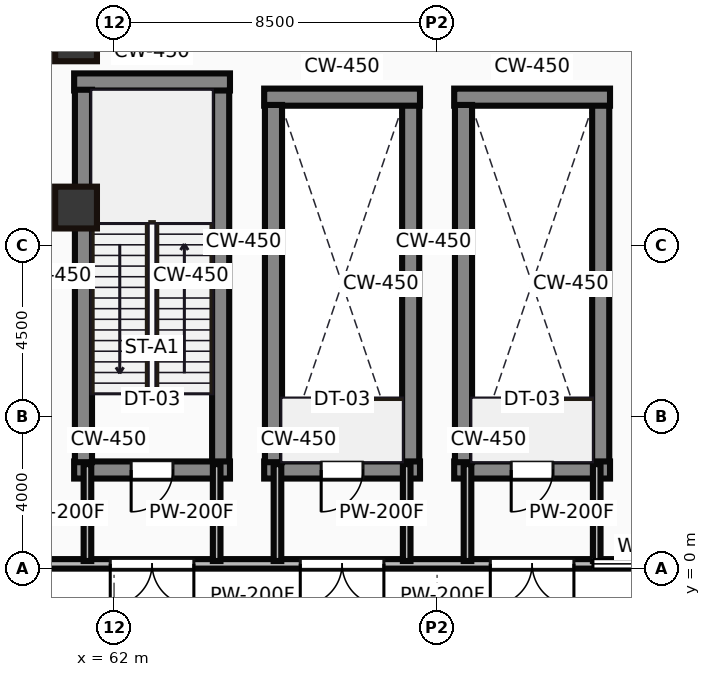
"""IFC4 building model, lengths in metres.
Left out: names, types, materials, properties, quantities, classifications, styles, units other than length and angle.
Written with IfcOpenShell. Run it as: python <this file> out.ifc"""

import sys

from ifc_helpers import new_model, si_unit, direction, frame, frame_2d, origin, origin_2d, place, context, subcontext, project, spatial, rectangle, hollow_rectangle, extrude, source, transform, mapped, element, fill, save


model = new_model("IFC4")
c1 = context("Model", 3, precision=1e-05, world=origin(), true_north=direction((0.0, 1.0)))
c2 = subcontext(c1, "Body", "Model", "MODEL_VIEW")
j1 = project(units=[si_unit("LENGTHUNIT", "METRE"), si_unit("PLANEANGLEUNIT", "RADIAN")], contexts=[c1])
p1 = place(None, origin())
s1 = spatial("IfcSite", under=j1, at=p1, CompositionType="ELEMENT")
p2 = place(p1, origin())
s2 = spatial("IfcBuilding", under=s1, at=p2, CompositionType="ELEMENT")
p3 = place(p2, origin())
s3 = spatial("IfcBuildingStorey", under=s2, at=p3, CompositionType="ELEMENT", Elevation=0.0)
m1 = source(origin(), c2, "Body", "SweptSolid", [
    extrude(hollow_rectangle(XDim=1.1, YDim=1.3, WallThickness=0.055, at=origin_2d()), origin(), (0.0, 0.0, 1.0), 6.0),
])
p4 = place(p3, frame((61.0, 14.0, 0.0), z_axis=(0.0, 0.0, 1.0), x_axis=(1.0, 0.0, 0.0)))
e1 = element("IfcColumn", 1, at=p4, inside=s3, PredefinedType="PILASTER", context=c2, shape_type="MappedRepresentation", body=[
    mapped(m1, transform((0.0, 0.0, 0.0))),
])
m2 = source(origin(), c2, "Body", "SweptSolid", [
    extrude(hollow_rectangle(XDim=1.1, YDim=1.1, WallThickness=0.05, at=origin_2d()), origin(), (0.0, 0.0, 1.0), 6.0),
])
p5 = place(p3, frame((61.0, 9.5, 0.0), z_axis=(0.0, 0.0, 1.0), x_axis=(1.0, 0.0, 0.0)))
e2 = element("IfcColumn", 2, at=p5, inside=s3, PredefinedType="PILASTER", context=c2, shape_type="MappedRepresentation", body=[
    mapped(m2, transform((0.0, 0.0, 0.0))),
])
m3 = source(origin(), c2, "Body", "SweptSolid", [
    extrude(rectangle(XDim=48.0, YDim=0.25, at=frame_2d((24.0, 0.0))), origin(), (0.0, 0.0, 1.0), 5.7),
])
p6 = place(p3, frame((34.0, 0.125, 0.0), z_axis=(0.0, 0.0, 1.0), x_axis=(1.0, 0.0, 0.0)))
e3 = element("IfcWall", 3, at=p6, inside=s3, PredefinedType="STANDARD", context=c2, shape_type="MappedRepresentation", body=[
    mapped(m3, transform((0.0, 0.0, 0.0))),
])
p7 = place(p6, frame((1.2, 0.0, 0.0)))
e4 = element("IfcOpeningElement", 4, at=p7, cuts=e3, PredefinedType="OPENING", context=c2, shape_type="SweptSolid", body=[
    extrude(rectangle(XDim=2.2, YDim=2.4, at=frame_2d((1.1, 1.2))), frame((0.0, 0.135, 0.0), z_axis=(0.0, -1.0, 0.0), x_axis=(1.0, 0.0, 0.0)), (0.0, 0.0, 1.0), 0.27),
])
p8 = place(p6, frame((4.4, 0.0, 0.0)))
e5 = element("IfcOpeningElement", 5, at=p8, cuts=e3, PredefinedType="OPENING", context=c2, shape_type="SweptSolid", body=[
    extrude(rectangle(XDim=2.2, YDim=2.4, at=frame_2d((1.1, 1.2))), frame((0.0, 0.135, 0.0), z_axis=(0.0, -1.0, 0.0), x_axis=(1.0, 0.0, 0.0)), (0.0, 0.0, 1.0), 0.27),
])
p9 = place(p6, frame((10.2, 0.0, 0.0)))
e6 = element("IfcOpeningElement", 6, at=p9, cuts=e3, PredefinedType="OPENING", context=c2, shape_type="SweptSolid", body=[
    extrude(rectangle(XDim=2.2, YDim=2.4, at=frame_2d((1.1, 1.2))), frame((0.0, 0.135, 0.0), z_axis=(0.0, -1.0, 0.0), x_axis=(1.0, 0.0, 0.0)), (0.0, 0.0, 1.0), 0.27),
])
p10 = place(p6, frame((13.4, 0.0, 0.0)))
e7 = element("IfcOpeningElement", 7, at=p10, cuts=e3, PredefinedType="OPENING", context=c2, shape_type="SweptSolid", body=[
    extrude(rectangle(XDim=2.2, YDim=2.4, at=frame_2d((1.1, 1.2))), frame((0.0, 0.135, 0.0), z_axis=(0.0, -1.0, 0.0), x_axis=(1.0, 0.0, 0.0)), (0.0, 0.0, 1.0), 0.27),
])
p11 = place(p6, frame((17.8, 0.0, 0.0)))
e8 = element("IfcOpeningElement", 8, at=p11, cuts=e3, PredefinedType="OPENING", context=c2, shape_type="SweptSolid", body=[
    extrude(rectangle(XDim=2.2, YDim=2.4, at=frame_2d((1.1, 1.2))), frame((0.0, 0.135, 0.0), z_axis=(0.0, -1.0, 0.0), x_axis=(1.0, 0.0, 0.0)), (0.0, 0.0, 1.0), 0.27),
])
p12 = place(p6, frame((21.0, 0.0, 0.0)))
e9 = element("IfcOpeningElement", 9, at=p12, cuts=e3, PredefinedType="OPENING", context=c2, shape_type="SweptSolid", body=[
    extrude(rectangle(XDim=2.2, YDim=2.4, at=frame_2d((1.1, 1.2))), frame((0.0, 0.135, 0.0), z_axis=(0.0, -1.0, 0.0), x_axis=(1.0, 0.0, 0.0)), (0.0, 0.0, 1.0), 0.27),
])
p13 = place(p6, frame((23.6, 0.0, 0.0)))
e10 = element("IfcOpeningElement", 10, at=p13, cuts=e3, PredefinedType="OPENING", context=c2, shape_type="SweptSolid", body=[
    extrude(rectangle(XDim=2.2, YDim=2.4, at=frame_2d((1.1, 1.2))), frame((0.0, 0.135, 0.0), z_axis=(0.0, -1.0, 0.0), x_axis=(1.0, 0.0, 0.0)), (0.0, 0.0, 1.0), 0.27),
])
p14 = place(p6, frame((27.9, 0.0, 0.0)))
e11 = element("IfcOpeningElement", 11, at=p14, cuts=e3, PredefinedType="OPENING", context=c2, shape_type="SweptSolid", body=[
    extrude(rectangle(XDim=2.2, YDim=2.4, at=frame_2d((1.1, 1.2))), frame((0.0, 0.135, 0.0), z_axis=(0.0, -1.0, 0.0), x_axis=(1.0, 0.0, 0.0)), (0.0, 0.0, 1.0), 0.27),
])
p15 = place(p6, frame((32.9, 0.0, 0.0)))
e12 = element("IfcOpeningElement", 12, at=p15, cuts=e3, PredefinedType="OPENING", context=c2, shape_type="SweptSolid", body=[
    extrude(rectangle(XDim=2.2, YDim=2.4, at=frame_2d((1.1, 1.2))), frame((0.0, 0.135, 0.0), z_axis=(0.0, -1.0, 0.0), x_axis=(1.0, 0.0, 0.0)), (0.0, 0.0, 1.0), 0.27),
])
p16 = place(p6, frame((37.9, 0.0, 0.0)))
e13 = element("IfcOpeningElement", 13, at=p16, cuts=e3, PredefinedType="OPENING", context=c2, shape_type="SweptSolid", body=[
    extrude(rectangle(XDim=2.2, YDim=2.4, at=frame_2d((1.1, 1.2))), frame((0.0, 0.135, 0.0), z_axis=(0.0, -1.0, 0.0), x_axis=(1.0, 0.0, 0.0)), (0.0, 0.0, 1.0), 0.27),
])
p17 = place(p6, frame((44.2, 0.0, 0.0)))
e14 = element("IfcOpeningElement", 14, at=p17, cuts=e3, PredefinedType="OPENING", context=c2, shape_type="SweptSolid", body=[
    extrude(rectangle(XDim=2.2, YDim=2.4, at=frame_2d((1.1, 1.2))), frame((0.0, 0.135, 0.0), z_axis=(0.0, -1.0, 0.0), x_axis=(1.0, 0.0, 0.0)), (0.0, 0.0, 1.0), 0.27),
])
p18 = place(p6, frame((40.6, 0.0, 0.9)))
e15 = element("IfcOpeningElement", 15, at=p18, cuts=e3, PredefinedType="OPENING", context=c2, shape_type="SweptSolid", body=[
    extrude(rectangle(XDim=3.0, YDim=2.4, at=frame_2d((1.5, 1.2))), frame((0.0, 0.135, 0.0), z_axis=(0.0, -1.0, 0.0), x_axis=(1.0, 0.0, 0.0)), (0.0, 0.0, 1.0), 0.27),
])
m4 = source(origin(), c2, "Body", "SweptSolid", [
    extrude(rectangle(XDim=4.1, YDim=0.45, at=frame_2d((2.05, 0.0))), origin(), (0.0, 0.0, 1.0), 6.0),
])
p19 = place(p3, frame((60.95, 2.595, 0.0), z_axis=(0.0, 0.0, 1.0), x_axis=(1.0, 0.0, 0.0)))
e16 = element("IfcWall", 16, at=p19, inside=s3, PredefinedType="SHEAR", context=c2, shape_type="MappedRepresentation", body=[
    mapped(m4, transform((0.0, 0.0, 0.0))),
])
p20 = place(p19, frame((1.5, 0.0, 0.0)))
e17 = element("IfcOpeningElement", 17, at=p20, cuts=e16, PredefinedType="OPENING", context=c2, shape_type="SweptSolid", body=[
    extrude(rectangle(XDim=1.1, YDim=2.15, at=frame_2d((0.55, 1.075))), frame((0.0, 0.235, 0.0), z_axis=(0.0, -1.0, 0.0), x_axis=(1.0, 0.0, 0.0)), (0.0, 0.0, 1.0), 0.47),
])
m5 = source(origin(), c2, "Body", "SweptSolid", [
    extrude(rectangle(XDim=9.8, YDim=0.45, at=frame_2d((4.9, 0.0))), origin(), (0.0, 0.0, 1.0), 6.0),
])
for number, where, z_axis, x_axis in (
    (18, (61.195, 2.8, 0.0), (0.0, 0.0, 1.0), (0.0, 1.0, 0.0)),
    (19, (64.805, 2.8, 0.0), (0.0, 0.0, 1.0), (0.0, 1.0, 0.0)),
):
    element("IfcWall", number, at=place(p3, frame(where, z_axis=z_axis, x_axis=x_axis)), inside=s3, PredefinedType="SHEAR", context=c2, shape_type="MappedRepresentation", body=[
        mapped(m5, transform((0.0, 0.0, 0.0))),
    ])
p21 = place(p3, frame((60.95, 12.805, 0.0), z_axis=(0.0, 0.0, 1.0), x_axis=(1.0, 0.0, 0.0)))
e20 = element("IfcWall", 20, at=p21, inside=s3, PredefinedType="SHEAR", context=c2, shape_type="MappedRepresentation", body=[
    mapped(m4, transform((0.0, 0.0, 0.0))),
])
m6 = source(origin(), c2, "Body", "SweptSolid", [
    extrude(rectangle(XDim=4.1, YDim=0.45, at=frame_2d((2.05, 0.0))), origin(), (0.0, 0.0, 1.0), 5.7),
])
p22 = place(p3, frame((65.95, 2.595, 0.0), z_axis=(0.0, 0.0, 1.0), x_axis=(1.0, 0.0, 0.0)))
e21 = element("IfcWall", 21, at=p22, inside=s3, PredefinedType="SHEAR", context=c2, shape_type="MappedRepresentation", body=[
    mapped(m6, transform((0.0, 0.0, 0.0))),
])
p23 = place(p22, frame((1.5, 0.0, 0.0)))
e22 = element("IfcOpeningElement", 22, at=p23, cuts=e21, PredefinedType="OPENING", context=c2, shape_type="SweptSolid", body=[
    extrude(rectangle(XDim=1.1, YDim=2.15, at=frame_2d((0.55, 1.075))), frame((0.0, 0.235, 0.0), z_axis=(0.0, -1.0, 0.0), x_axis=(1.0, 0.0, 0.0)), (0.0, 0.0, 1.0), 0.47),
])
m7 = source(origin(), c2, "Body", "SweptSolid", [
    extrude(rectangle(XDim=9.4, YDim=0.45, at=frame_2d((4.7, 0.0))), origin(), (0.0, 0.0, 1.0), 5.7),
])
for number, where, z_axis, x_axis in (
    (23, (66.195, 2.8, 0.0), (0.0, 0.0, 1.0), (0.0, 1.0, 0.0)),
    (24, (69.805, 2.8, 0.0), (0.0, 0.0, 1.0), (0.0, 1.0, 0.0)),
):
    element("IfcWall", number, at=place(p3, frame(where, z_axis=z_axis, x_axis=x_axis)), inside=s3, PredefinedType="SHEAR", context=c2, shape_type="MappedRepresentation", body=[
        mapped(m7, transform((0.0, 0.0, 0.0))),
    ])
p24 = place(p3, frame((65.95, 12.405, 0.0), z_axis=(0.0, 0.0, 1.0), x_axis=(1.0, 0.0, 0.0)))
e25 = element("IfcWall", 25, at=p24, inside=s3, PredefinedType="SHEAR", context=c2, shape_type="MappedRepresentation", body=[
    mapped(m6, transform((0.0, 0.0, 0.0))),
])
p25 = place(p3, frame((70.95, 2.595, 0.0), z_axis=(0.0, 0.0, 1.0), x_axis=(1.0, 0.0, 0.0)))
e26 = element("IfcWall", 26, at=p25, inside=s3, PredefinedType="SHEAR", context=c2, shape_type="MappedRepresentation", body=[
    mapped(m6, transform((0.0, 0.0, 0.0))),
])
p26 = place(p25, frame((1.5, 0.0, 0.0)))
e27 = element("IfcOpeningElement", 27, at=p26, cuts=e26, PredefinedType="OPENING", context=c2, shape_type="SweptSolid", body=[
    extrude(rectangle(XDim=1.1, YDim=2.15, at=frame_2d((0.55, 1.075))), frame((0.0, 0.235, 0.0), z_axis=(0.0, -1.0, 0.0), x_axis=(1.0, 0.0, 0.0)), (0.0, 0.0, 1.0), 0.47),
])
for number, where, z_axis, x_axis in (
    (28, (71.195, 2.8, 0.0), (0.0, 0.0, 1.0), (0.0, 1.0, 0.0)),
    (29, (74.805, 2.8, 0.0), (0.0, 0.0, 1.0), (0.0, 1.0, 0.0)),
):
    element("IfcWall", number, at=place(p3, frame(where, z_axis=z_axis, x_axis=x_axis)), inside=s3, PredefinedType="SHEAR", context=c2, shape_type="MappedRepresentation", body=[
        mapped(m7, transform((0.0, 0.0, 0.0))),
    ])
p27 = place(p3, frame((70.95, 12.405, 0.0), z_axis=(0.0, 0.0, 1.0), x_axis=(1.0, 0.0, 0.0)))
e30 = element("IfcWall", 30, at=p27, inside=s3, PredefinedType="SHEAR", context=c2, shape_type="MappedRepresentation", body=[
    mapped(m6, transform((0.0, 0.0, 0.0))),
])
m8 = source(origin(), c2, "Body", "SweptSolid", [
    extrude(rectangle(XDim=2.55, YDim=0.2, at=frame_2d((1.275, 0.0))), origin(), (0.0, 0.0, 1.0), 5.7),
])
for number, where, z_axis, x_axis in (
    (31, (61.3, 0.2, 0.0), (0.0, 0.0, 1.0), (0.0, 1.0, 0.0)),
    (32, (64.7, 0.2, 0.0), (0.0, 0.0, 1.0), (0.0, 1.0, 0.0)),
    (33, (66.3, 0.2, 0.0), (0.0, 0.0, 1.0), (0.0, 1.0, 0.0)),
    (34, (69.7, 0.2, 0.0), (0.0, 0.0, 1.0), (0.0, 1.0, 0.0)),
    (35, (71.3, 0.2, 0.0), (0.0, 0.0, 1.0), (0.0, 1.0, 0.0)),
    (36, (74.7, 0.2, 0.0), (0.0, 0.0, 1.0), (0.0, 1.0, 0.0)),
):
    element("IfcWall", number, at=place(p3, frame(where, z_axis=z_axis, x_axis=x_axis)), inside=s3, PredefinedType="PARTITIONING", context=c2, shape_type="MappedRepresentation", body=[
        mapped(m8, transform((0.0, 0.0, 0.0))),
    ])
m9 = source(origin(), c2, "Body", "SweptSolid", [
    extrude(rectangle(XDim=2.2, YDim=2.4, at=frame_2d((1.1, 1.2))), frame((0.0, 0.025, 0.0), z_axis=(0.0, -1.0, 0.0), x_axis=(1.0, 0.0, 0.0)), (0.0, 0.0, 1.0), 0.05),
])
p28 = place(p14, frame((2.2, 0.0, 0.0), z_axis=(0.0, 0.0, 1.0), x_axis=(-1.0, 0.0, 0.0)))
e37 = element("IfcDoor", 37, at=p28, inside=s3, OperationType="DOUBLE_DOOR_SINGLE_SWING", PredefinedType="DOOR", context=c2, shape_type="MappedRepresentation", body=[
    mapped(m9, transform((0.0, 0.0, 0.0))),
])
fill(e11, e37)
p29 = place(p15, frame((2.2, 0.0, 0.0), z_axis=(0.0, 0.0, 1.0), x_axis=(-1.0, 0.0, 0.0)))
e38 = element("IfcDoor", 38, at=p29, inside=s3, OperationType="DOUBLE_DOOR_SINGLE_SWING", PredefinedType="DOOR", context=c2, shape_type="MappedRepresentation", body=[
    mapped(m9, transform((0.0, 0.0, 0.0))),
])
fill(e12, e38)
p30 = place(p16, frame((2.2, 0.0, 0.0), z_axis=(0.0, 0.0, 1.0), x_axis=(-1.0, 0.0, 0.0)))
e39 = element("IfcDoor", 39, at=p30, inside=s3, OperationType="DOUBLE_DOOR_SINGLE_SWING", PredefinedType="DOOR", context=c2, shape_type="MappedRepresentation", body=[
    mapped(m9, transform((0.0, 0.0, 0.0))),
])
fill(e13, e39)
m10 = source(origin(), c2, "Body", "SweptSolid", [
    extrude(rectangle(XDim=3.0, YDim=2.4, at=frame_2d((1.5, 1.2))), frame((0.0, 0.03, 0.0), z_axis=(0.0, -1.0, 0.0), x_axis=(1.0, 0.0, 0.0)), (0.0, 0.0, 1.0), 0.06),
])
p31 = place(p18, origin())
e40 = element("IfcWindow", 40, at=p31, inside=s3, PartitioningType="SINGLE_PANEL", PredefinedType="WINDOW", context=c2, shape_type="MappedRepresentation", body=[
    mapped(m10, transform((0.0, 0.0, 0.0))),
])
fill(e15, e40)
m11 = source(origin(), c2, "Body", "SweptSolid", [
    extrude(rectangle(XDim=1.1, YDim=2.15, at=frame_2d((0.55, 1.075))), frame((0.0, 0.025, 0.0), z_axis=(0.0, -1.0, 0.0), x_axis=(1.0, 0.0, 0.0)), (0.0, 0.0, 1.0), 0.05),
])
p32 = place(p20, frame((1.1, 0.0, 0.0), z_axis=(0.0, 0.0, 1.0), x_axis=(-1.0, 0.0, 0.0)))
e41 = element("IfcDoor", 41, at=p32, inside=s3, OperationType="SINGLE_SWING_LEFT", PredefinedType="DOOR", context=c2, shape_type="MappedRepresentation", body=[
    mapped(m11, transform((0.0, 0.0, 0.0))),
])
fill(e17, e41)
p33 = place(p23, frame((1.1, 0.0, 0.0), z_axis=(0.0, 0.0, 1.0), x_axis=(-1.0, 0.0, 0.0)))
e42 = element("IfcDoor", 42, at=p33, inside=s3, OperationType="SINGLE_SWING_LEFT", PredefinedType="DOOR", context=c2, shape_type="MappedRepresentation", body=[
    mapped(m11, transform((0.0, 0.0, 0.0))),
])
fill(e22, e42)
p34 = place(p26, frame((1.1, 0.0, 0.0), z_axis=(0.0, 0.0, 1.0), x_axis=(-1.0, 0.0, 0.0)))
e43 = element("IfcDoor", 43, at=p34, inside=s3, OperationType="SINGLE_SWING_LEFT", PredefinedType="DOOR", context=c2, shape_type="MappedRepresentation", body=[
    mapped(m11, transform((0.0, 0.0, 0.0))),
])
fill(e27, e43)
save(model, sys.argv[1])
